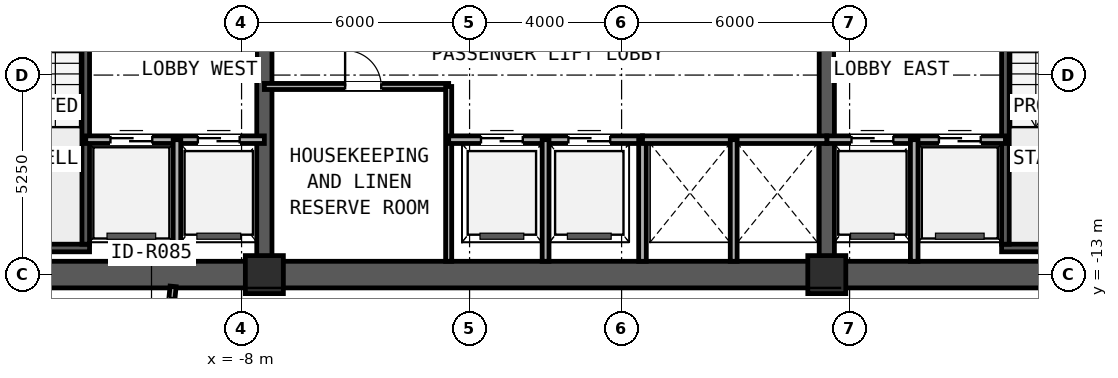
"""IFC4 building model, lengths in metres.
Left out: names, types, materials, properties, quantities, classifications, styles, units other than length and angle.
Written with IfcOpenShell. Run it as: python <this file> out.ifc"""

import sys

from ifc_helpers import new_model, si_unit, direction, frame, frame_2d, origin, origin_2d, place, context, subcontext, project, spatial, rectangle, extrude, element, fill, save


model = new_model("IFC4")
c1 = context("Model", 3, precision=1e-05, world=origin(), true_north=direction((0.0, 1.0)))
c2 = subcontext(c1, "Body", "Model", "MODEL_VIEW")
j1 = project(units=[si_unit("LENGTHUNIT", "METRE"), si_unit("PLANEANGLEUNIT", "RADIAN")], contexts=[c1])
p1 = place(None, origin())
s1 = spatial("IfcSite", under=j1, at=p1, CompositionType="ELEMENT")
p2 = place(p1, origin())
s2 = spatial("IfcBuilding", under=s1, at=p2, CompositionType="ELEMENT")
p3 = place(p2, frame((0.0, 0.0, 160.05)))
s3 = spatial("IfcBuildingStorey", under=s2, at=p3, CompositionType="ELEMENT", Elevation=160.05)
p4 = place(p3, frame((-16.35, -13.0, 0.0), z_axis=(0.0, 0.0, 1.0), x_axis=(1.0, 0.0, 0.0)))
e1 = element("IfcWall", 1, at=p4, inside=s3, PredefinedType="SHEAR", context=c2, shape_type="SweptSolid", body=[
    extrude(rectangle(XDim=32.7, YDim=0.7, at=frame_2d((16.35, 0.0))), origin(), (0.0, 0.0, 1.0), 2.91),
])
for number, where, z_axis, x_axis in (
    (2, (-7.4, -12.65, 0.0), (0.0, 0.0, 1.0), (0.0, 1.0, 0.0)),
    (3, (7.4, -12.65, 0.0), (0.0, 0.0, 1.0), (0.0, 1.0, 0.0)),
):
    element("IfcWall", number, at=place(p3, frame(where, z_axis=z_axis, x_axis=x_axis)), inside=s3, PredefinedType="SHEAR", context=c2, shape_type="SweptSolid", body=[
        extrude(rectangle(XDim=9.8, YDim=0.4, at=frame_2d((4.9, 0.0))), origin(), (0.0, 0.0, 1.0), 3.19),
    ])
p5 = place(p3, frame((-15.65, -12.3, 0.0), z_axis=(0.0, 0.0, 1.0), x_axis=(1.0, 0.0, 0.0)))
e4 = element("IfcWall", 4, at=p5, inside=s3, PredefinedType="SOLIDWALL", context=c2, shape_type="SweptSolid", body=[
    extrude(rectangle(XDim=3.65, YDim=0.2, at=frame_2d((1.825, 0.0))), origin(), (0.0, 0.0, 1.0), 3.19),
])
p6 = place(p3, frame((-12.1, -12.2, 0.0), z_axis=(0.0, 0.0, 1.0), x_axis=(0.0, 1.0, 0.0)))
e5 = element("IfcWall", 5, at=p6, inside=s3, PredefinedType="SOLIDWALL", context=c2, shape_type="SweptSolid", body=[
    extrude(rectangle(XDim=7.0, YDim=0.2, at=frame_2d((3.5, 0.0))), origin(), (0.0, 0.0, 1.0), 3.19),
])
p7 = place(p6, frame((5.8, 0.0, 0.0)))
e6 = element("IfcOpeningElement", 6, at=p7, cuts=e5, PredefinedType="OPENING", context=c2, shape_type="SweptSolid", body=[
    extrude(rectangle(XDim=1.0, YDim=2.1, at=frame_2d((0.5, 1.05))), frame((0.0, 0.11, 0.0), z_axis=(0.0, -1.0, 0.0), x_axis=(1.0, 0.0, 0.0)), (0.0, 0.0, 1.0), 0.22),
])
p8 = place(p3, frame((12.0, -12.3, 0.0), z_axis=(0.0, 0.0, 1.0), x_axis=(1.0, 0.0, 0.0)))
e7 = element("IfcWall", 7, at=p8, inside=s3, PredefinedType="SOLIDWALL", context=c2, shape_type="SweptSolid", body=[
    extrude(rectangle(XDim=3.65, YDim=0.2, at=frame_2d((1.825, 0.0))), origin(), (0.0, 0.0, 1.0), 3.19),
])
p9 = place(p3, frame((12.1, -12.2, 0.0), z_axis=(0.0, 0.0, 1.0), x_axis=(0.0, 1.0, 0.0)))
e8 = element("IfcWall", 8, at=p9, inside=s3, PredefinedType="SOLIDWALL", context=c2, shape_type="SweptSolid", body=[
    extrude(rectangle(XDim=7.0, YDim=0.2, at=frame_2d((3.5, 0.0))), origin(), (0.0, 0.0, 1.0), 3.19),
])
p10 = place(p9, frame((5.8, 0.0, 0.0)))
e9 = element("IfcOpeningElement", 9, at=p10, cuts=e8, PredefinedType="OPENING", context=c2, shape_type="SweptSolid", body=[
    extrude(rectangle(XDim=1.0, YDim=2.1, at=frame_2d((0.5, 1.05))), frame((0.0, 0.11, 0.0), z_axis=(0.0, -1.0, 0.0), x_axis=(1.0, 0.0, 0.0)), (0.0, 0.0, 1.0), 0.22),
])
for number, where, z_axis, x_axis in (
    (10, (-7.4, -13.0, 0.0), (0.0, 0.0, 1.0), (1.0, 0.0, 0.0)),
    (11, (7.4, -13.0, 0.0), (0.0, 0.0, 1.0), (1.0, 0.0, 0.0)),
):
    element("IfcColumn", number, at=place(p3, frame(where, z_axis=z_axis, x_axis=x_axis)), inside=s3, PredefinedType="COLUMN", context=c2, shape_type="SweptSolid", body=[
        extrude(rectangle(XDim=1.0, YDim=1.0, at=origin_2d()), origin(), (0.0, 0.0, 1.0), 3.45),
    ])
p11 = place(p3, frame((-26.695, -13.016, 0.0), z_axis=(0.0, 0.0, 1.0), x_axis=(0.995396268366, -0.095845025554, 0.0)))
e12 = element("IfcWall", 12, at=p11, inside=s3, PredefinedType="STANDARD", context=c2, shape_type="SweptSolid", body=[
    extrude(rectangle(XDim=49.6, YDim=0.24, at=frame_2d((24.8, 0.0))), origin(), (0.0, 0.0, 1.0), 3.19),
])
p12 = place(p11, frame((6.044, 0.0, 0.7)))
e13 = element("IfcOpeningElement", 13, at=p12, cuts=e12, PredefinedType="OPENING", context=c2, shape_type="SweptSolid", body=[
    extrude(rectangle(XDim=1.8, YDim=1.5, at=frame_2d((0.9, 0.75))), frame((0.0, 0.13, 0.0), z_axis=(0.0, -1.0, 0.0), x_axis=(1.0, 0.0, 0.0)), (0.0, 0.0, 1.0), 0.26),
])
p13 = place(p11, frame((41.756, 0.0, 0.7)))
e14 = element("IfcOpeningElement", 14, at=p13, cuts=e12, PredefinedType="OPENING", context=c2, shape_type="SweptSolid", body=[
    extrude(rectangle(XDim=1.8, YDim=1.5, at=frame_2d((0.9, 0.75))), frame((0.0, 0.13, 0.0), z_axis=(0.0, -1.0, 0.0), x_axis=(1.0, 0.0, 0.0)), (0.0, 0.0, 1.0), 0.26),
])
p14 = place(p3, frame((-12.1, -9.45, 0.0), z_axis=(0.0, 0.0, 1.0), x_axis=(1.0, 0.0, 0.0)))
e15 = element("IfcWall", 15, at=p14, inside=s3, PredefinedType="PARTITIONING", context=c2, shape_type="SweptSolid", body=[
    extrude(rectangle(XDim=4.7, YDim=0.2, at=frame_2d((2.35, 0.0))), origin(), (0.0, 0.0, 1.0), 3.19),
])
p15 = place(p14, frame((0.65, 0.0, 0.0)))
e16 = element("IfcOpeningElement", 16, at=p15, cuts=e15, PredefinedType="OPENING", context=c2, shape_type="SweptSolid", body=[
    extrude(rectangle(XDim=1.1, YDim=2.2, at=frame_2d((0.55, 1.1))), frame((0.0, 0.11, 0.0), z_axis=(0.0, -1.0, 0.0), x_axis=(1.0, 0.0, 0.0)), (0.0, 0.0, 1.0), 0.22),
])
p16 = place(p14, frame((2.95, 0.0, 0.0)))
e17 = element("IfcOpeningElement", 17, at=p16, cuts=e15, PredefinedType="OPENING", context=c2, shape_type="SweptSolid", body=[
    extrude(rectangle(XDim=1.1, YDim=2.2, at=frame_2d((0.55, 1.1))), frame((0.0, 0.11, 0.0), z_axis=(0.0, -1.0, 0.0), x_axis=(1.0, 0.0, 0.0)), (0.0, 0.0, 1.0), 0.22),
])
p17 = place(p3, frame((-9.7, -12.65, 0.0), z_axis=(0.0, 0.0, 1.0), x_axis=(0.0, 1.0, 0.0)))
e18 = element("IfcWall", 18, at=p17, inside=s3, PredefinedType="PARTITIONING", context=c2, shape_type="SweptSolid", body=[
    extrude(rectangle(XDim=3.2, YDim=0.2, at=frame_2d((1.6, 0.0))), origin(), (0.0, 0.0, 1.0), 2.225),
])
p18 = place(p3, frame((7.4, -9.45, 0.0), z_axis=(0.0, 0.0, 1.0), x_axis=(1.0, 0.0, 0.0)))
e19 = element("IfcWall", 19, at=p18, inside=s3, PredefinedType="PARTITIONING", context=c2, shape_type="SweptSolid", body=[
    extrude(rectangle(XDim=4.7, YDim=0.2, at=frame_2d((2.35, 0.0))), origin(), (0.0, 0.0, 1.0), 3.19),
])
p19 = place(p18, frame((2.95, 0.0, 0.0)))
e20 = element("IfcOpeningElement", 20, at=p19, cuts=e19, PredefinedType="OPENING", context=c2, shape_type="SweptSolid", body=[
    extrude(rectangle(XDim=1.1, YDim=2.2, at=frame_2d((0.55, 1.1))), frame((0.0, 0.11, 0.0), z_axis=(0.0, -1.0, 0.0), x_axis=(1.0, 0.0, 0.0)), (0.0, 0.0, 1.0), 0.22),
])
p20 = place(p18, frame((0.65, 0.0, 0.0)))
e21 = element("IfcOpeningElement", 21, at=p20, cuts=e19, PredefinedType="OPENING", context=c2, shape_type="SweptSolid", body=[
    extrude(rectangle(XDim=1.1, YDim=2.2, at=frame_2d((0.55, 1.1))), frame((0.0, 0.11, 0.0), z_axis=(0.0, -1.0, 0.0), x_axis=(1.0, 0.0, 0.0)), (0.0, 0.0, 1.0), 0.22),
])
p21 = place(p3, frame((9.7, -12.65, 0.0), z_axis=(0.0, 0.0, 1.0), x_axis=(0.0, 1.0, 0.0)))
e22 = element("IfcWall", 22, at=p21, inside=s3, PredefinedType="PARTITIONING", context=c2, shape_type="SweptSolid", body=[
    extrude(rectangle(XDim=3.2, YDim=0.2, at=frame_2d((1.6, 0.0))), origin(), (0.0, 0.0, 1.0), 2.225),
])
p22 = place(p3, frame((-7.4, -8.05, 0.0), z_axis=(0.0, 0.0, 1.0), x_axis=(1.0, 0.0, 0.0)))
e23 = element("IfcWall", 23, at=p22, inside=s3, PredefinedType="PARTITIONING", context=c2, shape_type="SweptSolid", body=[
    extrude(rectangle(XDim=4.85, YDim=0.16, at=frame_2d((2.425, 0.0))), origin(), (0.0, 0.0, 1.0), 3.19),
])
p23 = place(p22, frame((2.125, 0.0, 0.0)))
e24 = element("IfcOpeningElement", 24, at=p23, cuts=e23, PredefinedType="OPENING", context=c2, shape_type="SweptSolid", body=[
    extrude(rectangle(XDim=0.95, YDim=2.15, at=frame_2d((0.475, 1.075))), frame((0.0, 0.09, 0.0), z_axis=(0.0, -1.0, 0.0), x_axis=(1.0, 0.0, 0.0)), (0.0, 0.0, 1.0), 0.18),
])
p24 = place(p3, frame((-2.55, -12.65, 0.0), z_axis=(0.0, 0.0, 1.0), x_axis=(0.0, 1.0, 0.0)))
e25 = element("IfcWall", 25, at=p24, inside=s3, PredefinedType="PARTITIONING", context=c2, shape_type="SweptSolid", body=[
    extrude(rectangle(XDim=4.6, YDim=0.16, at=frame_2d((2.3, 0.0))), origin(), (0.0, 0.0, 1.0), 2.225),
])
p25 = place(p3, frame((-2.55, -9.45, 0.0), z_axis=(0.0, 0.0, 1.0), x_axis=(1.0, 0.0, 0.0)))
e26 = element("IfcWall", 26, at=p25, inside=s3, PredefinedType="PARTITIONING", context=c2, shape_type="SweptSolid", body=[
    extrude(rectangle(XDim=5.1, YDim=0.2, at=frame_2d((2.55, 0.0))), origin(), (0.0, 0.0, 1.0), 3.19),
])
p26 = place(p25, frame((0.85, 0.0, 0.0)))
e27 = element("IfcOpeningElement", 27, at=p26, cuts=e26, PredefinedType="OPENING", context=c2, shape_type="SweptSolid", body=[
    extrude(rectangle(XDim=1.1, YDim=2.2, at=frame_2d((0.55, 1.1))), frame((0.0, 0.11, 0.0), z_axis=(0.0, -1.0, 0.0), x_axis=(1.0, 0.0, 0.0)), (0.0, 0.0, 1.0), 0.22),
])
p27 = place(p25, frame((3.15, 0.0, 0.0)))
e28 = element("IfcOpeningElement", 28, at=p27, cuts=e26, PredefinedType="OPENING", context=c2, shape_type="SweptSolid", body=[
    extrude(rectangle(XDim=1.1, YDim=2.2, at=frame_2d((0.55, 1.1))), frame((0.0, 0.11, 0.0), z_axis=(0.0, -1.0, 0.0), x_axis=(1.0, 0.0, 0.0)), (0.0, 0.0, 1.0), 0.22),
])
p28 = place(p3, frame((0.0, -12.65, 0.0), z_axis=(0.0, 0.0, 1.0), x_axis=(0.0, 1.0, 0.0)))
e29 = element("IfcWall", 29, at=p28, inside=s3, PredefinedType="PARTITIONING", context=c2, shape_type="SweptSolid", body=[
    extrude(rectangle(XDim=3.2, YDim=0.18, at=frame_2d((1.6, 0.0))), origin(), (0.0, 0.0, 1.0), 2.225),
])
p29 = place(p3, frame((2.55, -12.65, 0.0), z_axis=(0.0, 0.0, 1.0), x_axis=(0.0, 1.0, 0.0)))
e30 = element("IfcWall", 30, at=p29, inside=s3, PredefinedType="PARTITIONING", context=c2, shape_type="SweptSolid", body=[
    extrude(rectangle(XDim=3.2, YDim=0.2, at=frame_2d((1.6, 0.0))), origin(), (0.0, 0.0, 1.0), 2.225),
])
p30 = place(p3, frame((2.55, -9.45, 0.0), z_axis=(0.0, 0.0, 1.0), x_axis=(1.0, 0.0, 0.0)))
e31 = element("IfcWall", 31, at=p30, inside=s3, PredefinedType="PARTITIONING", context=c2, shape_type="SweptSolid", body=[
    extrude(rectangle(XDim=4.85, YDim=0.2, at=frame_2d((2.425, 0.0))), origin(), (0.0, 0.0, 1.0), 3.19),
])
p31 = place(p3, frame((4.95, -12.65, 0.0), z_axis=(0.0, 0.0, 1.0), x_axis=(0.0, 1.0, 0.0)))
e32 = element("IfcWall", 32, at=p31, inside=s3, PredefinedType="PARTITIONING", context=c2, shape_type="SweptSolid", body=[
    extrude(rectangle(XDim=3.2, YDim=0.18, at=frame_2d((1.6, 0.0))), origin(), (0.0, 0.0, 1.0), 2.225),
])
p32 = place(p3, frame((-9.802, -13.31, 0.0), z_axis=(0.0, 0.0, 1.0), x_axis=(-0.095930256126, -0.995388057975, 0.0)))
e33 = element("IfcWall", 33, at=p32, inside=s3, PredefinedType="PARTITIONING", context=c2, shape_type="SweptSolid", body=[
    extrude(rectangle(XDim=1.367, YDim=0.16, at=frame_2d((0.683, 0.0))), origin(), (0.0, 0.0, 1.0), 2.225),
])
p33 = place(p32, frame((0.306, 0.0, 0.0)))
e34 = element("IfcOpeningElement", 34, at=p33, cuts=e33, PredefinedType="OPENING", context=c2, shape_type="SweptSolid", body=[
    extrude(rectangle(XDim=0.85, YDim=2.05, at=frame_2d((0.425, 1.025))), frame((0.0, 0.09, 0.0), z_axis=(0.0, -1.0, 0.0), x_axis=(1.0, 0.0, 0.0)), (0.0, 0.0, 1.0), 0.18),
])
p34 = place(p15, origin())
e35 = element("IfcDoor", 35, at=p34, inside=s3, OperationType="SLIDING_TO_LEFT", PredefinedType="DOOR", context=c2, shape_type="SweptSolid", body=[
    extrude(rectangle(XDim=1.1, YDim=2.2, at=frame_2d((0.55, 1.1))), frame((0.0, 0.025, 0.0), z_axis=(0.0, -1.0, 0.0), x_axis=(1.0, 0.0, 0.0)), (0.0, 0.0, 1.0), 0.05),
])
fill(e16, e35)
p35 = place(p16, origin())
e36 = element("IfcDoor", 36, at=p35, inside=s3, OperationType="SLIDING_TO_RIGHT", PredefinedType="DOOR", context=c2, shape_type="SweptSolid", body=[
    extrude(rectangle(XDim=1.1, YDim=2.2, at=frame_2d((0.55, 1.1))), frame((0.0, 0.025, 0.0), z_axis=(0.0, -1.0, 0.0), x_axis=(1.0, 0.0, 0.0)), (0.0, 0.0, 1.0), 0.05),
])
fill(e17, e36)
p36 = place(p19, origin())
e37 = element("IfcDoor", 37, at=p36, inside=s3, OperationType="SLIDING_TO_LEFT", PredefinedType="DOOR", context=c2, shape_type="SweptSolid", body=[
    extrude(rectangle(XDim=1.1, YDim=2.2, at=frame_2d((0.55, 1.1))), frame((0.0, 0.025, 0.0), z_axis=(0.0, -1.0, 0.0), x_axis=(1.0, 0.0, 0.0)), (0.0, 0.0, 1.0), 0.05),
])
fill(e20, e37)
p37 = place(p20, origin())
e38 = element("IfcDoor", 38, at=p37, inside=s3, OperationType="SLIDING_TO_RIGHT", PredefinedType="DOOR", context=c2, shape_type="SweptSolid", body=[
    extrude(rectangle(XDim=1.1, YDim=2.2, at=frame_2d((0.55, 1.1))), frame((0.0, 0.025, 0.0), z_axis=(0.0, -1.0, 0.0), x_axis=(1.0, 0.0, 0.0)), (0.0, 0.0, 1.0), 0.05),
])
fill(e21, e38)
p38 = place(p23, origin())
e39 = element("IfcDoor", 39, at=p38, inside=s3, OperationType="SINGLE_SWING_LEFT", PredefinedType="DOOR", context=c2, shape_type="SweptSolid", body=[
    extrude(rectangle(XDim=0.95, YDim=2.15, at=frame_2d((0.475, 1.075))), frame((0.0, 0.025, 0.0), z_axis=(0.0, -1.0, 0.0), x_axis=(1.0, 0.0, 0.0)), (0.0, 0.0, 1.0), 0.05),
])
fill(e24, e39)
p39 = place(p26, origin())
e40 = element("IfcDoor", 40, at=p39, inside=s3, OperationType="SLIDING_TO_RIGHT", PredefinedType="DOOR", context=c2, shape_type="SweptSolid", body=[
    extrude(rectangle(XDim=1.1, YDim=2.2, at=frame_2d((0.55, 1.1))), frame((0.0, 0.025, 0.0), z_axis=(0.0, -1.0, 0.0), x_axis=(1.0, 0.0, 0.0)), (0.0, 0.0, 1.0), 0.05),
])
fill(e27, e40)
p40 = place(p27, origin())
e41 = element("IfcDoor", 41, at=p40, inside=s3, OperationType="SLIDING_TO_RIGHT", PredefinedType="DOOR", context=c2, shape_type="SweptSolid", body=[
    extrude(rectangle(XDim=1.1, YDim=2.2, at=frame_2d((0.55, 1.1))), frame((0.0, 0.025, 0.0), z_axis=(0.0, -1.0, 0.0), x_axis=(1.0, 0.0, 0.0)), (0.0, 0.0, 1.0), 0.05),
])
fill(e28, e41)
p41 = place(p33, frame((0.85, 0.0, 0.0), z_axis=(0.0, 0.0, 1.0), x_axis=(-1.0, 0.0, 0.0)))
e42 = element("IfcDoor", 42, at=p41, inside=s3, OperationType="SINGLE_SWING_RIGHT", PredefinedType="DOOR", context=c2, shape_type="SweptSolid", body=[
    extrude(rectangle(XDim=0.85, YDim=2.05, at=frame_2d((0.425, 1.025))), frame((0.0, 0.025, 0.0), z_axis=(0.0, -1.0, 0.0), x_axis=(1.0, 0.0, 0.0)), (0.0, 0.0, 1.0), 0.05),
])
fill(e34, e42)
save(model, sys.argv[1])
